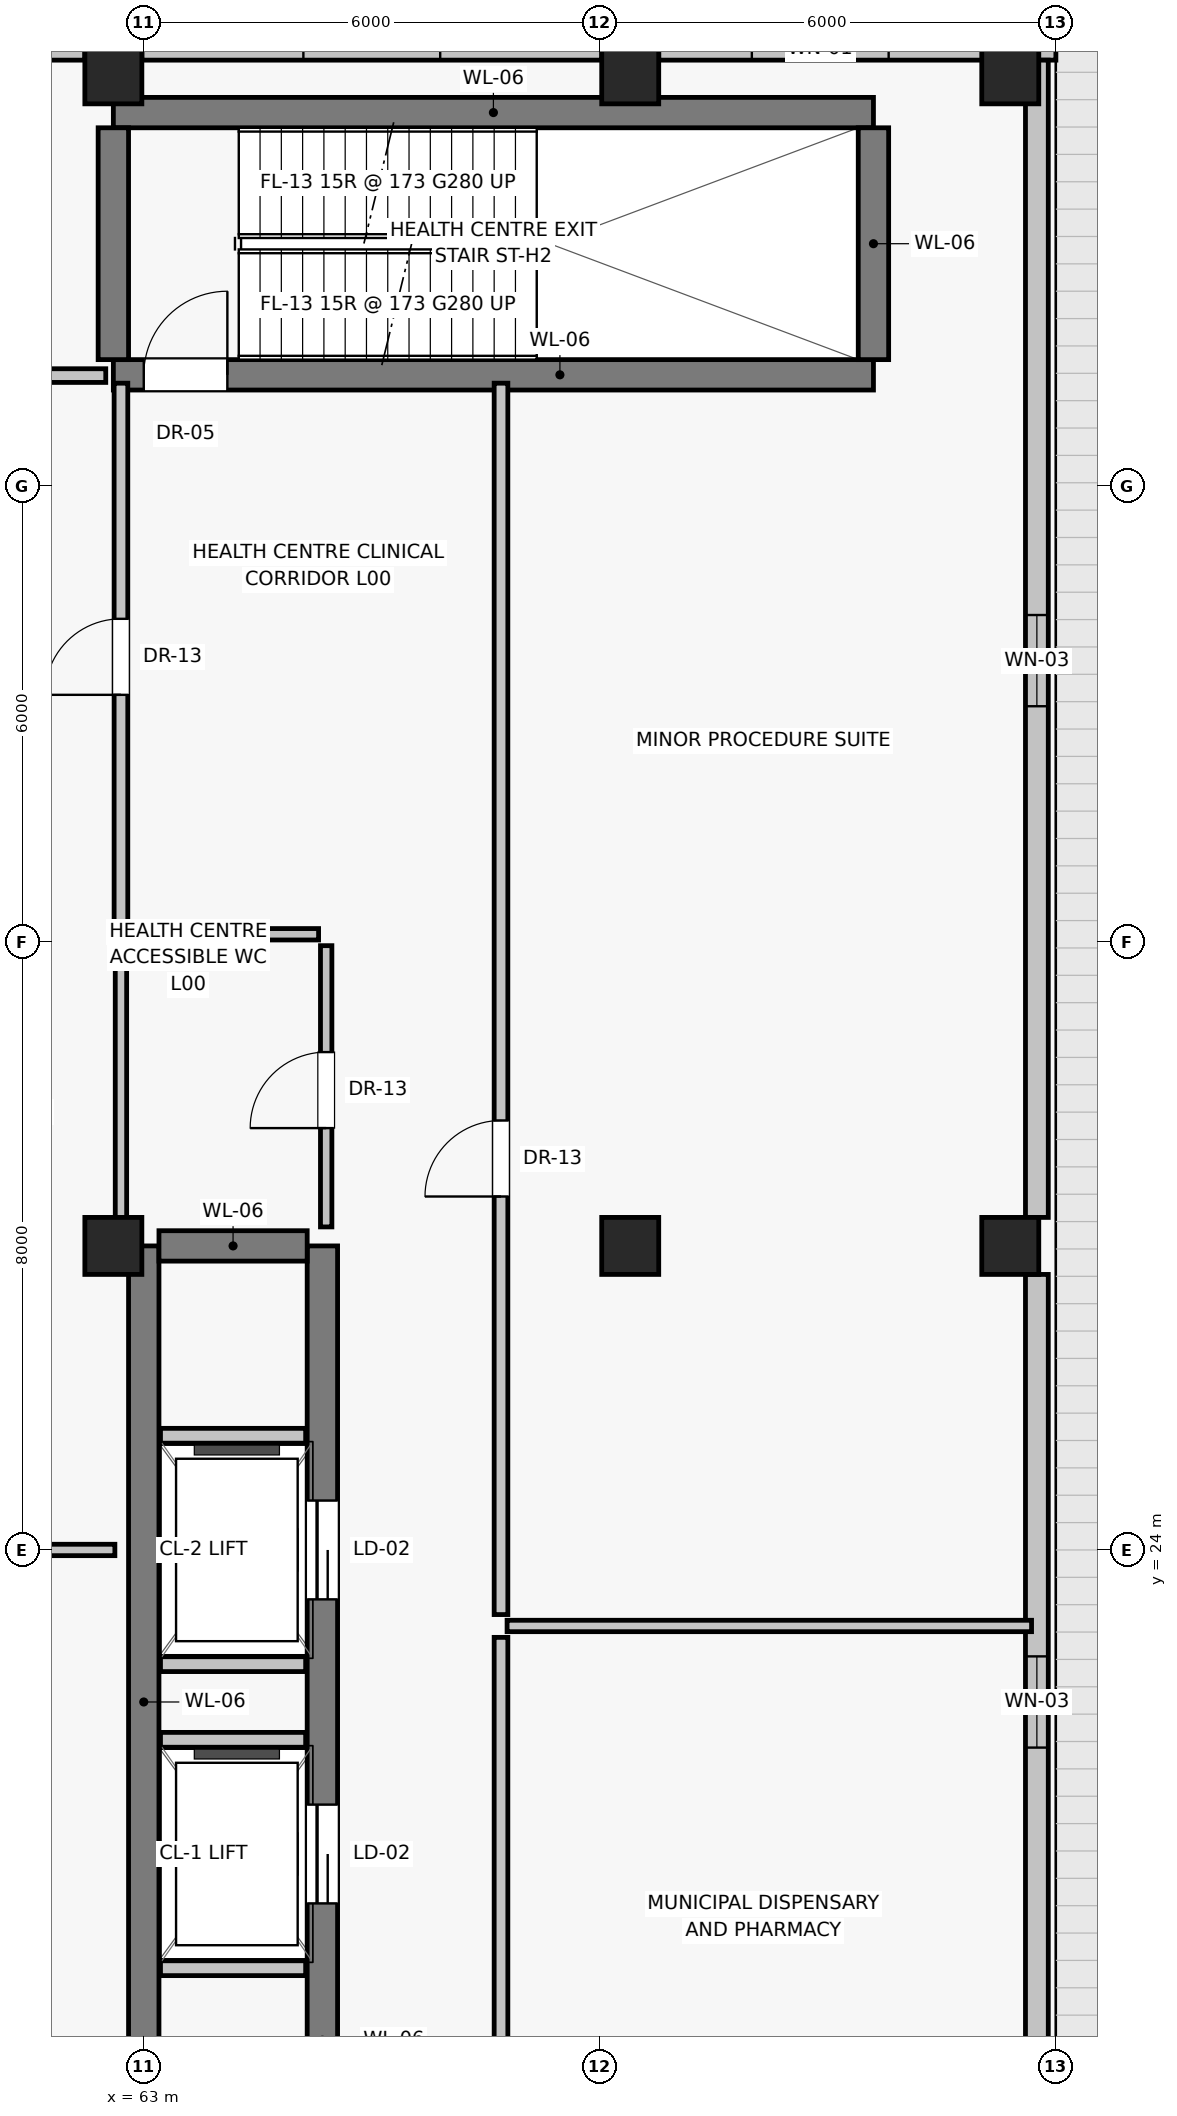
"""IFC4 building model, lengths in metres.
Left out: names, types, materials, properties, quantities, classifications, styles, units other than length and angle.
Written with IfcOpenShell. Run it as: python <this file> out.ifc"""

import sys

from ifc_helpers import new_model, si_unit, direction, frame, frame_2d, origin, origin_2d, place, context, subcontext, project, spatial, rectangle, extrude, source, transform, mapped, element, fill, save


model = new_model("IFC4")
c1 = context("Model", 3, precision=1e-05, world=origin(), true_north=direction((0.0, 1.0)))
c2 = subcontext(c1, "Body", "Model", "MODEL_VIEW")
j1 = project(units=[si_unit("LENGTHUNIT", "METRE"), si_unit("PLANEANGLEUNIT", "RADIAN")], contexts=[c1])
p1 = place(None, origin())
s1 = spatial("IfcSite", under=j1, at=p1, CompositionType="ELEMENT")
p2 = place(p1, origin())
s2 = spatial("IfcBuilding", under=s1, at=p2, CompositionType="ELEMENT")
p3 = place(p2, origin())
s3 = spatial("IfcBuildingStorey", under=s2, at=p3, CompositionType="ELEMENT", Elevation=0.0)
for number, where, z_axis, x_axis in (
    (1, (62.6, 28.0, 0.0), (0.0, 0.0, 1.0), (1.0, 0.0, 0.0)),
    (2, (62.6, 43.4, 0.0), (0.0, 0.0, 1.0), (1.0, 0.0, 0.0)),
    (3, (69.4, 28.0, 0.0), (0.0, 0.0, 1.0), (1.0, 0.0, 0.0)),
    (4, (69.4, 43.4, 0.0), (0.0, 0.0, 1.0), (1.0, 0.0, 0.0)),
    (5, (74.4, 28.0, 0.0), (0.0, 0.0, 1.0), (1.0, 0.0, 0.0)),
    (6, (74.4, 43.4, 0.0), (0.0, 0.0, 1.0), (1.0, 0.0, 0.0)),
):
    element("IfcColumn", number, at=place(p3, frame(where, z_axis=z_axis, x_axis=x_axis)), inside=s3, PredefinedType="COLUMN", context=c2, shape_type="SweptSolid", body=[
        extrude(rectangle(XDim=0.75, YDim=0.75, at=origin_2d()), origin(), (0.0, 0.0, 1.0), 5.2),
    ])
p4 = place(p3, frame((75.0, 43.75, 0.0), z_axis=(0.0, 0.0, 1.0), x_axis=(-1.0, 0.0, 0.0)))
e7 = element("IfcWall", 7, at=p4, inside=s3, PredefinedType="SOLIDWALL", context=c2, shape_type="SweptSolid", body=[
    extrude(rectangle(XDim=5.225, YDim=0.3, at=frame_2d((2.613, 0.0))), origin(), (0.0, 0.0, 1.0), 4.15),
])
p5 = place(p4, frame((2.2, 0.0, 0.85)))
e8 = element("IfcOpeningElement", 8, at=p5, cuts=e7, PredefinedType="OPENING", context=c2, shape_type="SweptSolid", body=[
    extrude(rectangle(XDim=1.8, YDim=1.65, at=frame_2d((0.9, 0.825))), frame((0.0, 0.16, 0.0), z_axis=(0.0, -1.0, 0.0), x_axis=(1.0, 0.0, 0.0)), (0.0, 0.0, 1.0), 0.32),
])
p6 = place(p3, frame((69.025, 43.75, 0.0), z_axis=(0.0, 0.0, 1.0), x_axis=(-1.0, 0.0, 0.0)))
e9 = element("IfcWall", 9, at=p6, inside=s3, PredefinedType="SOLIDWALL", context=c2, shape_type="SweptSolid", body=[
    extrude(rectangle(XDim=6.05, YDim=0.3, at=frame_2d((3.025, 0.0))), origin(), (0.0, 0.0, 1.0), 4.15),
])
p7 = place(p6, frame((2.125, 0.0, 0.85)))
e10 = element("IfcOpeningElement", 10, at=p7, cuts=e9, PredefinedType="OPENING", context=c2, shape_type="SweptSolid", body=[
    extrude(rectangle(XDim=1.8, YDim=1.65, at=frame_2d((0.9, 0.825))), frame((0.0, 0.16, 0.0), z_axis=(0.0, -1.0, 0.0), x_axis=(1.0, 0.0, 0.0)), (0.0, 0.0, 1.0), 0.32),
])
p8 = place(p3, frame((62.225, 43.75, 0.0), z_axis=(0.0, 0.0, 1.0), x_axis=(-1.0, 0.0, 0.0)))
e11 = element("IfcWall", 11, at=p8, inside=s3, PredefinedType="SOLIDWALL", context=c2, shape_type="SweptSolid", body=[
    extrude(rectangle(XDim=5.225, YDim=0.3, at=frame_2d((2.613, 0.0))), origin(), (0.0, 0.0, 1.0), 4.15),
])
p9 = place(p8, frame((1.425, 0.0, 0.0)))
e12 = element("IfcOpeningElement", 12, at=p9, cuts=e11, PredefinedType="OPENING", context=c2, shape_type="SweptSolid", body=[
    extrude(rectangle(XDim=1.4, YDim=2.3, at=frame_2d((0.7, 1.15))), frame((0.0, 0.16, 0.0), z_axis=(0.0, -1.0, 0.0), x_axis=(1.0, 0.0, 0.0)), (0.0, 0.0, 1.0), 0.32),
])
p10 = place(p3, frame((74.75, 16.375, 0.0), z_axis=(0.0, 0.0, 1.0), x_axis=(0.0, 1.0, 0.0)))
e13 = element("IfcWall", 13, at=p10, inside=s3, PredefinedType="SOLIDWALL", context=c2, shape_type="SweptSolid", body=[
    extrude(rectangle(XDim=11.25, YDim=0.3, at=frame_2d((5.625, 0.0))), origin(), (0.0, 0.0, 1.0), 4.15),
])
p11 = place(p10, frame((5.025, 0.0, 0.95)))
e14 = element("IfcOpeningElement", 14, at=p11, cuts=e13, PredefinedType="OPENING", context=c2, shape_type="SweptSolid", body=[
    extrude(rectangle(XDim=1.2, YDim=1.5, at=frame_2d((0.6, 0.75))), frame((0.0, 0.16, 0.0), z_axis=(0.0, -1.0, 0.0), x_axis=(1.0, 0.0, 0.0)), (0.0, 0.0, 1.0), 0.32),
])
p12 = place(p3, frame((74.75, 28.375, 0.0), z_axis=(0.0, 0.0, 1.0), x_axis=(0.0, 1.0, 0.0)))
e15 = element("IfcWall", 15, at=p12, inside=s3, PredefinedType="SOLIDWALL", context=c2, shape_type="SweptSolid", body=[
    extrude(rectangle(XDim=15.225, YDim=0.3, at=frame_2d((7.613, 0.0))), origin(), (0.0, 0.0, 1.0), 4.15),
])
p13 = place(p12, frame((6.725, 0.0, 0.95)))
e16 = element("IfcOpeningElement", 16, at=p13, cuts=e15, PredefinedType="OPENING", context=c2, shape_type="SweptSolid", body=[
    extrude(rectangle(XDim=1.2, YDim=1.5, at=frame_2d((0.6, 0.75))), frame((0.0, 0.16, 0.0), z_axis=(0.0, -1.0, 0.0), x_axis=(1.0, 0.0, 0.0)), (0.0, 0.0, 1.0), 0.32),
])
p14 = place(p3, frame((63.0, 16.0, 0.0), z_axis=(0.0, 0.0, 1.0), x_axis=(0.0, 1.0, 0.0)))
e17 = element("IfcWall", 17, at=p14, inside=s3, PredefinedType="SHEAR", context=c2, shape_type="SweptSolid", body=[
    extrude(rectangle(XDim=12.0, YDim=0.4, at=frame_2d((6.0, 0.0))), origin(), (0.0, 0.0, 1.0), 4.9),
])
p15 = place(p3, frame((65.35, 16.0, 0.0), z_axis=(0.0, 0.0, 1.0), x_axis=(0.0, 1.0, 0.0)))
e18 = element("IfcWall", 18, at=p15, inside=s3, PredefinedType="SHEAR", context=c2, shape_type="SweptSolid", body=[
    extrude(rectangle(XDim=12.0, YDim=0.4, at=frame_2d((6.0, 0.0))), origin(), (0.0, 0.0, 1.0), 4.9),
])
p16 = place(p15, frame((3.35, 0.0, 0.0)))
e19 = element("IfcOpeningElement", 19, at=p16, cuts=e18, PredefinedType="OPENING", context=c2, shape_type="SweptSolid", body=[
    extrude(rectangle(XDim=1.3, YDim=2.25, at=frame_2d((0.65, 1.125))), frame((0.0, 0.21, 0.0), z_axis=(0.0, -1.0, 0.0), x_axis=(1.0, 0.0, 0.0)), (0.0, 0.0, 1.0), 0.42),
])
p17 = place(p15, frame((7.35, 0.0, 0.0)))
e20 = element("IfcOpeningElement", 20, at=p17, cuts=e18, PredefinedType="OPENING", context=c2, shape_type="SweptSolid", body=[
    extrude(rectangle(XDim=1.3, YDim=2.25, at=frame_2d((0.65, 1.125))), frame((0.0, 0.21, 0.0), z_axis=(0.0, -1.0, 0.0), x_axis=(1.0, 0.0, 0.0)), (0.0, 0.0, 1.0), 0.42),
])
p18 = place(p3, frame((63.2, 28.0, 0.0), z_axis=(0.0, 0.0, 1.0), x_axis=(1.0, 0.0, 0.0)))
e21 = element("IfcWall", 21, at=p18, inside=s3, PredefinedType="SHEAR", context=c2, shape_type="SweptSolid", body=[
    extrude(rectangle(XDim=1.95, YDim=0.4, at=frame_2d((0.975, 0.0))), origin(), (0.0, 0.0, 1.0), 4.9),
])
for number, where, z_axis, x_axis in (
    (22, (63.22, 18.5, 0.0), (0.0, 0.0, 1.0), (1.0, 0.0, 0.0)),
    (23, (63.22, 21.5, 0.0), (0.0, 0.0, 1.0), (1.0, 0.0, 0.0)),
    (24, (63.22, 22.5, 0.0), (0.0, 0.0, 1.0), (1.0, 0.0, 0.0)),
    (25, (63.22, 25.5, 0.0), (0.0, 0.0, 1.0), (1.0, 0.0, 0.0)),
):
    element("IfcWall", number, at=place(p3, frame(where, z_axis=z_axis, x_axis=x_axis)), inside=s3, PredefinedType="SOLIDWALL", context=c2, shape_type="SweptSolid", body=[
        extrude(rectangle(XDim=1.91, YDim=0.2, at=frame_2d((0.955, 0.0))), origin(), (0.0, 0.0, 1.0), 4.9),
    ])
p19 = place(p3, frame((62.6, 39.46, 0.0), z_axis=(0.0, 0.0, 1.0), x_axis=(1.0, 0.0, 0.0)))
e26 = element("IfcWall", 26, at=p19, inside=s3, PredefinedType="SHEAR", context=c2, shape_type="SweptSolid", body=[
    extrude(rectangle(XDim=10.0, YDim=0.4, at=frame_2d((5.0, 0.0))), origin(), (0.0, 0.0, 1.0), 4.9),
])
p20 = place(p19, frame((0.4, 0.0, 0.0)))
e27 = element("IfcOpeningElement", 27, at=p20, cuts=e26, PredefinedType="OPENING", context=c2, shape_type="SweptSolid", body=[
    extrude(rectangle(XDim=1.1, YDim=2.03, at=frame_2d((0.55, 1.015))), frame((0.0, 0.21, 0.0), z_axis=(0.0, -1.0, 0.0), x_axis=(1.0, 0.0, 0.0)), (0.0, 0.0, 1.0), 0.42),
])
p21 = place(p3, frame((62.6, 42.91, 0.0), z_axis=(0.0, 0.0, 1.0), x_axis=(1.0, 0.0, 0.0)))
e28 = element("IfcWall", 28, at=p21, inside=s3, PredefinedType="SHEAR", context=c2, shape_type="SweptSolid", body=[
    extrude(rectangle(XDim=10.0, YDim=0.4, at=frame_2d((5.0, 0.0))), origin(), (0.0, 0.0, 1.0), 4.9),
])
for number, where, z_axis, x_axis in (
    (29, (62.6, 39.66, 0.0), (0.0, 0.0, 1.0), (0.0, 1.0, 0.0)),
    (30, (72.6, 39.66, 0.0), (0.0, 0.0, 1.0), (0.0, 1.0, 0.0)),
):
    element("IfcWall", number, at=place(p3, frame(where, z_axis=z_axis, x_axis=x_axis)), inside=s3, PredefinedType="SHEAR", context=c2, shape_type="SweptSolid", body=[
        extrude(rectangle(XDim=3.05, YDim=0.4, at=frame_2d((1.525, 0.0))), origin(), (0.0, 0.0, 1.0), 4.9),
    ])
p22 = place(p3, frame((57.45, 39.45, 0.0), z_axis=(0.0, 0.0, 1.0), x_axis=(1.0, 0.0, 0.0)))
e31 = element("IfcWall", 31, at=p22, inside=s3, PredefinedType="PARTITIONING", context=c2, shape_type="SweptSolid", body=[
    extrude(rectangle(XDim=5.05, YDim=0.18, at=frame_2d((2.525, 0.0))), origin(), (0.0, 0.0, 1.0), 4.9),
])
p23 = place(p3, frame((62.8, 32.1, 0.0), z_axis=(0.0, 0.0, 1.0), x_axis=(1.0, 0.0, 0.0)))
e32 = element("IfcWall", 32, at=p23, inside=s3, PredefinedType="PARTITIONING", context=c2, shape_type="SweptSolid", body=[
    extrude(rectangle(XDim=2.5, YDim=0.15, at=frame_2d((1.25, 0.0))), origin(), (0.0, 0.0, 1.0), 4.9),
])
p24 = place(p3, frame((62.7, 28.2, 0.0), z_axis=(0.0, 0.0, 1.0), x_axis=(0.0, 1.0, 0.0)))
e33 = element("IfcWall", 33, at=p24, inside=s3, PredefinedType="PARTITIONING", context=c2, shape_type="SweptSolid", body=[
    extrude(rectangle(XDim=3.8, YDim=0.15, at=frame_2d((1.9, 0.0))), origin(), (0.0, 0.0, 1.0), 4.3),
])
p25 = place(p3, frame((65.4, 28.25, 0.0), z_axis=(0.0, 0.0, 1.0), x_axis=(0.0, 1.0, 0.0)))
e34 = element("IfcWall", 34, at=p25, inside=s3, PredefinedType="PARTITIONING", context=c2, shape_type="SweptSolid", body=[
    extrude(rectangle(XDim=3.7, YDim=0.15, at=frame_2d((1.85, 0.0))), origin(), (0.0, 0.0, 1.0), 4.9),
])
p26 = place(p25, frame((1.3, 0.0, 0.0)))
e35 = element("IfcOpeningElement", 35, at=p26, cuts=e34, PredefinedType="OPENING", context=c2, shape_type="SweptSolid", body=[
    extrude(rectangle(XDim=1.0, YDim=2.01, at=frame_2d((0.5, 1.005))), frame((0.0, 0.085, 0.0), z_axis=(0.0, -1.0, 0.0), x_axis=(1.0, 0.0, 0.0)), (0.0, 0.0, 1.0), 0.17),
])
p27 = place(p3, frame((62.7, 32.25, 0.0), z_axis=(0.0, 0.0, 1.0), x_axis=(0.0, 1.0, 0.0)))
e36 = element("IfcWall", 36, at=p27, inside=s3, PredefinedType="PARTITIONING", context=c2, shape_type="SweptSolid", body=[
    extrude(rectangle(XDim=7.1, YDim=0.18, at=frame_2d((3.55, 0.0))), origin(), (0.0, 0.0, 1.0), 4.3),
])
p28 = place(p27, frame((3.0, 0.0, 0.0)))
e37 = element("IfcOpeningElement", 37, at=p28, cuts=e36, PredefinedType="OPENING", context=c2, shape_type="SweptSolid", body=[
    extrude(rectangle(XDim=1.0, YDim=2.01, at=frame_2d((0.5, 1.005))), frame((0.0, 0.1, 0.0), z_axis=(0.0, -1.0, 0.0), x_axis=(1.0, 0.0, 0.0)), (0.0, 0.0, 1.0), 0.2),
])
p29 = place(p3, frame((57.32, 24.0, 0.0), z_axis=(0.0, 0.0, 1.0), x_axis=(1.0, 0.0, 0.0)))
e38 = element("IfcWall", 38, at=p29, inside=s3, PredefinedType="PARTITIONING", context=c2, shape_type="SweptSolid", body=[
    extrude(rectangle(XDim=5.3, YDim=0.15, at=frame_2d((2.65, 0.0))), origin(), (0.0, 0.0, 1.0), 4.9),
])
p30 = place(p3, frame((67.7, 8.65, 0.0), z_axis=(0.0, 0.0, 1.0), x_axis=(0.0, 1.0, 0.0)))
e39 = element("IfcWall", 39, at=p30, inside=s3, PredefinedType="PARTITIONING", context=c2, shape_type="SweptSolid", body=[
    extrude(rectangle(XDim=14.2, YDim=0.18, at=frame_2d((7.1, 0.0))), origin(), (0.0, 0.0, 1.0), 4.9),
])
p31 = place(p30, frame((5.5, 0.0, 0.0)))
e40 = element("IfcOpeningElement", 40, at=p31, cuts=e39, PredefinedType="OPENING", context=c2, shape_type="SweptSolid", body=[
    extrude(rectangle(XDim=1.0, YDim=2.01, at=frame_2d((0.5, 1.005))), frame((0.0, 0.1, 0.0), z_axis=(0.0, -1.0, 0.0), x_axis=(1.0, 0.0, 0.0)), (0.0, 0.0, 1.0), 0.2),
])
p32 = place(p3, frame((67.7, 23.15, 0.0), z_axis=(0.0, 0.0, 1.0), x_axis=(0.0, 1.0, 0.0)))
e41 = element("IfcWall", 41, at=p32, inside=s3, PredefinedType="PARTITIONING", context=c2, shape_type="SweptSolid", body=[
    extrude(rectangle(XDim=16.2, YDim=0.18, at=frame_2d((8.1, 0.0))), origin(), (0.0, 0.0, 1.0), 4.9),
])
p33 = place(p32, frame((5.5, 0.0, 0.0)))
e42 = element("IfcOpeningElement", 42, at=p33, cuts=e41, PredefinedType="OPENING", context=c2, shape_type="SweptSolid", body=[
    extrude(rectangle(XDim=1.0, YDim=2.01, at=frame_2d((0.5, 1.005))), frame((0.0, 0.1, 0.0), z_axis=(0.0, -1.0, 0.0), x_axis=(1.0, 0.0, 0.0)), (0.0, 0.0, 1.0), 0.2),
])
p34 = place(p3, frame((67.78, 23.0, 0.0), z_axis=(0.0, 0.0, 1.0), x_axis=(1.0, 0.0, 0.0)))
e43 = element("IfcWall", 43, at=p34, inside=s3, PredefinedType="PARTITIONING", context=c2, shape_type="SweptSolid", body=[
    extrude(rectangle(XDim=6.9, YDim=0.15, at=frame_2d((3.45, 0.0))), origin(), (0.0, 0.0, 1.0), 4.9),
])
m1 = source(origin(), c2, "Body", "SweptSolid", [
    extrude(rectangle(XDim=1.2, YDim=1.5, at=frame_2d((0.6, 0.75))), frame((0.0, 0.03, 0.0), z_axis=(0.0, -1.0, 0.0), x_axis=(1.0, 0.0, 0.0)), (0.0, 0.0, 1.0), 0.06),
])
p35 = place(p11, origin())
e44 = element("IfcWindow", 44, at=p35, inside=s3, PartitioningType="SINGLE_PANEL", PredefinedType="WINDOW", context=c2, shape_type="MappedRepresentation", body=[
    mapped(m1, transform((0.0, 0.0, 0.0), scale=1.0)),
])
fill(e14, e44)
p36 = place(p13, origin())
e45 = element("IfcWindow", 45, at=p36, inside=s3, PartitioningType="SINGLE_PANEL", PredefinedType="WINDOW", context=c2, shape_type="MappedRepresentation", body=[
    mapped(m1, transform((0.0, 0.0, 0.0), scale=1.0)),
])
fill(e16, e45)
m2 = source(origin(), c2, "Body", "SweptSolid", [
    extrude(rectangle(XDim=1.3, YDim=2.25, at=frame_2d((0.65, 1.125))), frame((0.0, 0.025, 0.0), z_axis=(0.0, -1.0, 0.0), x_axis=(1.0, 0.0, 0.0)), (0.0, 0.0, 1.0), 0.05),
])
p37 = place(p16, origin())
e46 = element("IfcDoor", 46, at=p37, inside=s3, OperationType="SLIDING_TO_LEFT", PredefinedType="DOOR", context=c2, shape_type="MappedRepresentation", body=[
    mapped(m2, transform((0.0, 0.0, 0.0), scale=1.0)),
])
fill(e19, e46)
p38 = place(p17, origin())
e47 = element("IfcDoor", 47, at=p38, inside=s3, OperationType="SLIDING_TO_LEFT", PredefinedType="DOOR", context=c2, shape_type="MappedRepresentation", body=[
    mapped(m2, transform((0.0, 0.0, 0.0), scale=1.0)),
])
fill(e20, e47)
m3 = source(origin(), c2, "Body", "SweptSolid", [
    extrude(rectangle(XDim=1.1, YDim=2.03, at=frame_2d((0.55, 1.015))), frame((0.0, 0.025, 0.0), z_axis=(0.0, -1.0, 0.0), x_axis=(1.0, 0.0, 0.0)), (0.0, 0.0, 1.0), 0.05),
])
p39 = place(p20, origin())
e48 = element("IfcDoor", 48, at=p39, inside=s3, OperationType="SINGLE_SWING_RIGHT", PredefinedType="DOOR", context=c2, shape_type="MappedRepresentation", body=[
    mapped(m3, transform((0.0, 0.0, 0.0), scale=1.0)),
])
fill(e27, e48)
m4 = source(origin(), c2, "Body", "SweptSolid", [
    extrude(rectangle(XDim=1.0, YDim=2.01, at=frame_2d((0.5, 1.005))), frame((0.0, 0.025, 0.0), z_axis=(0.0, -1.0, 0.0), x_axis=(1.0, 0.0, 0.0)), (0.0, 0.0, 1.0), 0.05),
])
p40 = place(p26, origin())
e49 = element("IfcDoor", 49, at=p40, inside=s3, OperationType="SINGLE_SWING_LEFT", PredefinedType="DOOR", context=c2, shape_type="MappedRepresentation", body=[
    mapped(m4, transform((0.0, 0.0, 0.0), scale=1.0)),
])
fill(e35, e49)
p41 = place(p28, origin())
e50 = element("IfcDoor", 50, at=p41, inside=s3, OperationType="SINGLE_SWING_LEFT", PredefinedType="DOOR", context=c2, shape_type="MappedRepresentation", body=[
    mapped(m4, transform((0.0, 0.0, 0.0), scale=1.0)),
])
fill(e37, e50)
p42 = place(p33, origin())
e51 = element("IfcDoor", 51, at=p42, inside=s3, OperationType="SINGLE_SWING_LEFT", PredefinedType="DOOR", context=c2, shape_type="MappedRepresentation", body=[
    mapped(m4, transform((0.0, 0.0, 0.0), scale=1.0)),
])
fill(e42, e51)
save(model, sys.argv[1])
